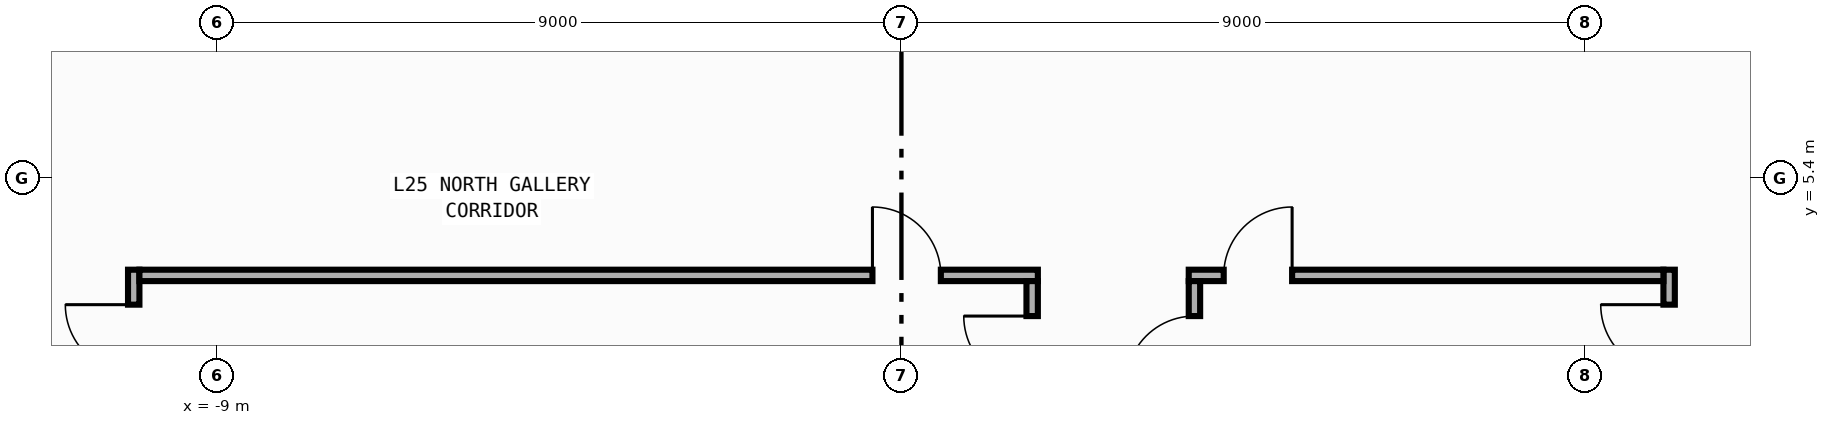
"""IFC4 building model, lengths in metres.
Left out: names, types, materials, properties, quantities, classifications, styles, units other than length and angle.
Written with IfcOpenShell. Run it as: python <this file> out.ifc"""

import sys

from ifc_helpers import new_model, si_unit, direction, frame, frame_2d, origin, place, context, subcontext, project, spatial, rectangle, extrude, element, fill, save


model = new_model("IFC4")
c1 = context("Model", 3, precision=1e-05, world=origin(), true_north=direction((0.0, 1.0)))
c2 = subcontext(c1, "Body", "Model", "MODEL_VIEW")
j1 = project(units=[si_unit("LENGTHUNIT", "METRE"), si_unit("PLANEANGLEUNIT", "RADIAN")], contexts=[c1])
p1 = place(None, origin())
s1 = spatial("IfcSite", under=j1, at=p1, CompositionType="ELEMENT")
p2 = place(p1, origin())
s2 = spatial("IfcBuilding", under=s1, at=p2, CompositionType="ELEMENT")
p3 = place(p2, frame((0.0, 0.0, 110.0)))
s3 = spatial("IfcBuildingStorey", under=s2, at=p3, CompositionType="ELEMENT", Elevation=110.0)
p4 = place(p3, frame((-10.1, -0.92, 0.0), z_axis=(0.0, 0.0, 1.0), x_axis=(0.0, 1.0, 0.0)))
e1 = element("IfcWall", 1, at=p4, inside=s3, PredefinedType="PARTITIONING", context=c2, shape_type="SweptSolid", body=[
    extrude(rectangle(XDim=5.115, YDim=0.15, at=frame_2d((2.558, 0.0))), origin(), (0.0, 0.0, 1.0), 3.94),
])
p5 = place(p4, frame((3.755, 0.0, 0.0)))
e2 = element("IfcOpeningElement", 2, at=p5, cuts=e1, PredefinedType="OPENING", context=c2, shape_type="SweptSolid", body=[
    extrude(rectangle(XDim=0.9, YDim=2.15, at=frame_2d((0.45, 1.075))), frame((0.0, 0.085, 0.0), z_axis=(0.0, -1.0, 0.0), x_axis=(1.0, 0.0, 0.0)), (0.0, 0.0, 1.0), 0.17),
])
p6 = place(p3, frame((10.1, -2.38, 0.0), z_axis=(0.0, 0.0, 1.0), x_axis=(0.0, 1.0, 0.0)))
e3 = element("IfcWall", 3, at=p6, inside=s3, PredefinedType="PARTITIONING", context=c2, shape_type="SweptSolid", body=[
    extrude(rectangle(XDim=6.575, YDim=0.15, at=frame_2d((3.288, 0.0))), origin(), (0.0, 0.0, 1.0), 3.94),
])
p7 = place(p6, frame((5.215, 0.0, 0.0)))
e4 = element("IfcOpeningElement", 4, at=p7, cuts=e3, PredefinedType="OPENING", context=c2, shape_type="SweptSolid", body=[
    extrude(rectangle(XDim=0.9, YDim=2.15, at=frame_2d((0.45, 1.075))), frame((0.0, 0.085, 0.0), z_axis=(0.0, -1.0, 0.0), x_axis=(1.0, 0.0, 0.0)), (0.0, 0.0, 1.0), 0.17),
])
p8 = place(p3, frame((3.78, 4.12, 0.0), z_axis=(0.0, 0.0, 1.0), x_axis=(1.0, 0.0, 0.0)))
e5 = element("IfcWall", 5, at=p8, inside=s3, PredefinedType="PARTITIONING", context=c2, shape_type="SweptSolid", body=[
    extrude(rectangle(XDim=6.245, YDim=0.15, at=frame_2d((3.123, 0.0))), origin(), (0.0, 0.0, 1.0), 3.94),
])
p9 = place(p8, frame((0.46, 0.0, 0.0)))
e6 = element("IfcOpeningElement", 6, at=p9, cuts=e5, PredefinedType="OPENING", context=c2, shape_type="SweptSolid", body=[
    extrude(rectangle(XDim=0.9, YDim=2.15, at=frame_2d((0.45, 1.075))), frame((0.0, 0.085, 0.0), z_axis=(0.0, -1.0, 0.0), x_axis=(1.0, 0.0, 0.0)), (0.0, 0.0, 1.0), 0.17),
])
p10 = place(p3, frame((-10.025, 4.12, 0.0), z_axis=(0.0, 0.0, 1.0), x_axis=(1.0, 0.0, 0.0)))
e7 = element("IfcWall", 7, at=p10, inside=s3, PredefinedType="PARTITIONING", context=c2, shape_type="SweptSolid", body=[
    extrude(rectangle(XDim=11.82, YDim=0.15, at=frame_2d((5.91, 0.0))), origin(), (0.0, 0.0, 1.0), 3.94),
])
p11 = place(p10, frame((9.644, 0.0, 0.0)))
e8 = element("IfcOpeningElement", 8, at=p11, cuts=e7, PredefinedType="OPENING", context=c2, shape_type="SweptSolid", body=[
    extrude(rectangle(XDim=0.9, YDim=2.15, at=frame_2d((0.45, 1.075))), frame((0.0, 0.085, 0.0), z_axis=(0.0, -1.0, 0.0), x_axis=(1.0, 0.0, 0.0)), (0.0, 0.0, 1.0), 0.17),
])
p12 = place(p3, frame((3.855, -2.22, 0.0), z_axis=(0.0, 0.0, 1.0), x_axis=(0.0, 1.0, 0.0)))
e9 = element("IfcWall", 9, at=p12, inside=s3, PredefinedType="PARTITIONING", context=c2, shape_type="SweptSolid", body=[
    extrude(rectangle(XDim=6.265, YDim=0.15, at=frame_2d((3.132, 0.0))), origin(), (0.0, 0.0, 1.0), 3.94),
])
p13 = place(p12, frame((4.905, 0.0, 0.0)))
e10 = element("IfcOpeningElement", 10, at=p13, cuts=e9, PredefinedType="OPENING", context=c2, shape_type="SweptSolid", body=[
    extrude(rectangle(XDim=0.9, YDim=2.15, at=frame_2d((0.45, 1.075))), frame((0.0, 0.085, 0.0), z_axis=(0.0, -1.0, 0.0), x_axis=(1.0, 0.0, 0.0)), (0.0, 0.0, 1.0), 0.17),
])
p14 = place(p3, frame((1.72, -1.08, 0.0), z_axis=(0.0, 0.0, 1.0), x_axis=(0.0, 1.0, 0.0)))
e11 = element("IfcWall", 11, at=p14, inside=s3, PredefinedType="PARTITIONING", context=c2, shape_type="SweptSolid", body=[
    extrude(rectangle(XDim=5.125, YDim=0.15, at=frame_2d((2.562, 0.0))), origin(), (0.0, 0.0, 1.0), 3.94),
])
p15 = place(p14, frame((3.765, 0.0, 0.0)))
e12 = element("IfcOpeningElement", 12, at=p15, cuts=e11, PredefinedType="OPENING", context=c2, shape_type="SweptSolid", body=[
    extrude(rectangle(XDim=0.9, YDim=2.15, at=frame_2d((0.45, 1.075))), frame((0.0, 0.085, 0.0), z_axis=(0.0, -1.0, 0.0), x_axis=(1.0, 0.0, 0.0)), (0.0, 0.0, 1.0), 0.17),
])
p16 = place(p5, origin())
e13 = element("IfcDoor", 13, at=p16, inside=s3, OperationType="SINGLE_SWING_RIGHT", PredefinedType="DOOR", context=c2, shape_type="SweptSolid", body=[
    extrude(rectangle(XDim=0.9, YDim=2.15, at=frame_2d((0.45, 1.075))), frame((0.0, 0.025, 0.0), z_axis=(0.0, -1.0, 0.0), x_axis=(1.0, 0.0, 0.0)), (0.0, 0.0, 1.0), 0.05),
])
fill(e2, e13)
p17 = place(p7, origin())
e14 = element("IfcDoor", 14, at=p17, inside=s3, OperationType="SINGLE_SWING_RIGHT", PredefinedType="DOOR", context=c2, shape_type="SweptSolid", body=[
    extrude(rectangle(XDim=0.9, YDim=2.15, at=frame_2d((0.45, 1.075))), frame((0.0, 0.025, 0.0), z_axis=(0.0, -1.0, 0.0), x_axis=(1.0, 0.0, 0.0)), (0.0, 0.0, 1.0), 0.05),
])
fill(e4, e14)
p18 = place(p9, origin())
e15 = element("IfcDoor", 15, at=p18, inside=s3, OperationType="SINGLE_SWING_RIGHT", PredefinedType="DOOR", context=c2, shape_type="SweptSolid", body=[
    extrude(rectangle(XDim=0.9, YDim=2.15, at=frame_2d((0.45, 1.075))), frame((0.0, 0.025, 0.0), z_axis=(0.0, -1.0, 0.0), x_axis=(1.0, 0.0, 0.0)), (0.0, 0.0, 1.0), 0.05),
])
fill(e6, e15)
p19 = place(p11, origin())
e16 = element("IfcDoor", 16, at=p19, inside=s3, OperationType="SINGLE_SWING_LEFT", PredefinedType="DOOR", context=c2, shape_type="SweptSolid", body=[
    extrude(rectangle(XDim=0.9, YDim=2.15, at=frame_2d((0.45, 1.075))), frame((0.0, 0.025, 0.0), z_axis=(0.0, -1.0, 0.0), x_axis=(1.0, 0.0, 0.0)), (0.0, 0.0, 1.0), 0.05),
])
fill(e8, e16)
p20 = place(p13, origin())
e17 = element("IfcDoor", 17, at=p20, inside=s3, OperationType="SINGLE_SWING_LEFT", PredefinedType="DOOR", context=c2, shape_type="SweptSolid", body=[
    extrude(rectangle(XDim=0.9, YDim=2.15, at=frame_2d((0.45, 1.075))), frame((0.0, 0.025, 0.0), z_axis=(0.0, -1.0, 0.0), x_axis=(1.0, 0.0, 0.0)), (0.0, 0.0, 1.0), 0.05),
])
fill(e10, e17)
p21 = place(p15, origin())
e18 = element("IfcDoor", 18, at=p21, inside=s3, OperationType="SINGLE_SWING_RIGHT", PredefinedType="DOOR", context=c2, shape_type="SweptSolid", body=[
    extrude(rectangle(XDim=0.9, YDim=2.15, at=frame_2d((0.45, 1.075))), frame((0.0, 0.025, 0.0), z_axis=(0.0, -1.0, 0.0), x_axis=(1.0, 0.0, 0.0)), (0.0, 0.0, 1.0), 0.05),
])
fill(e12, e18)
save(model, sys.argv[1])
